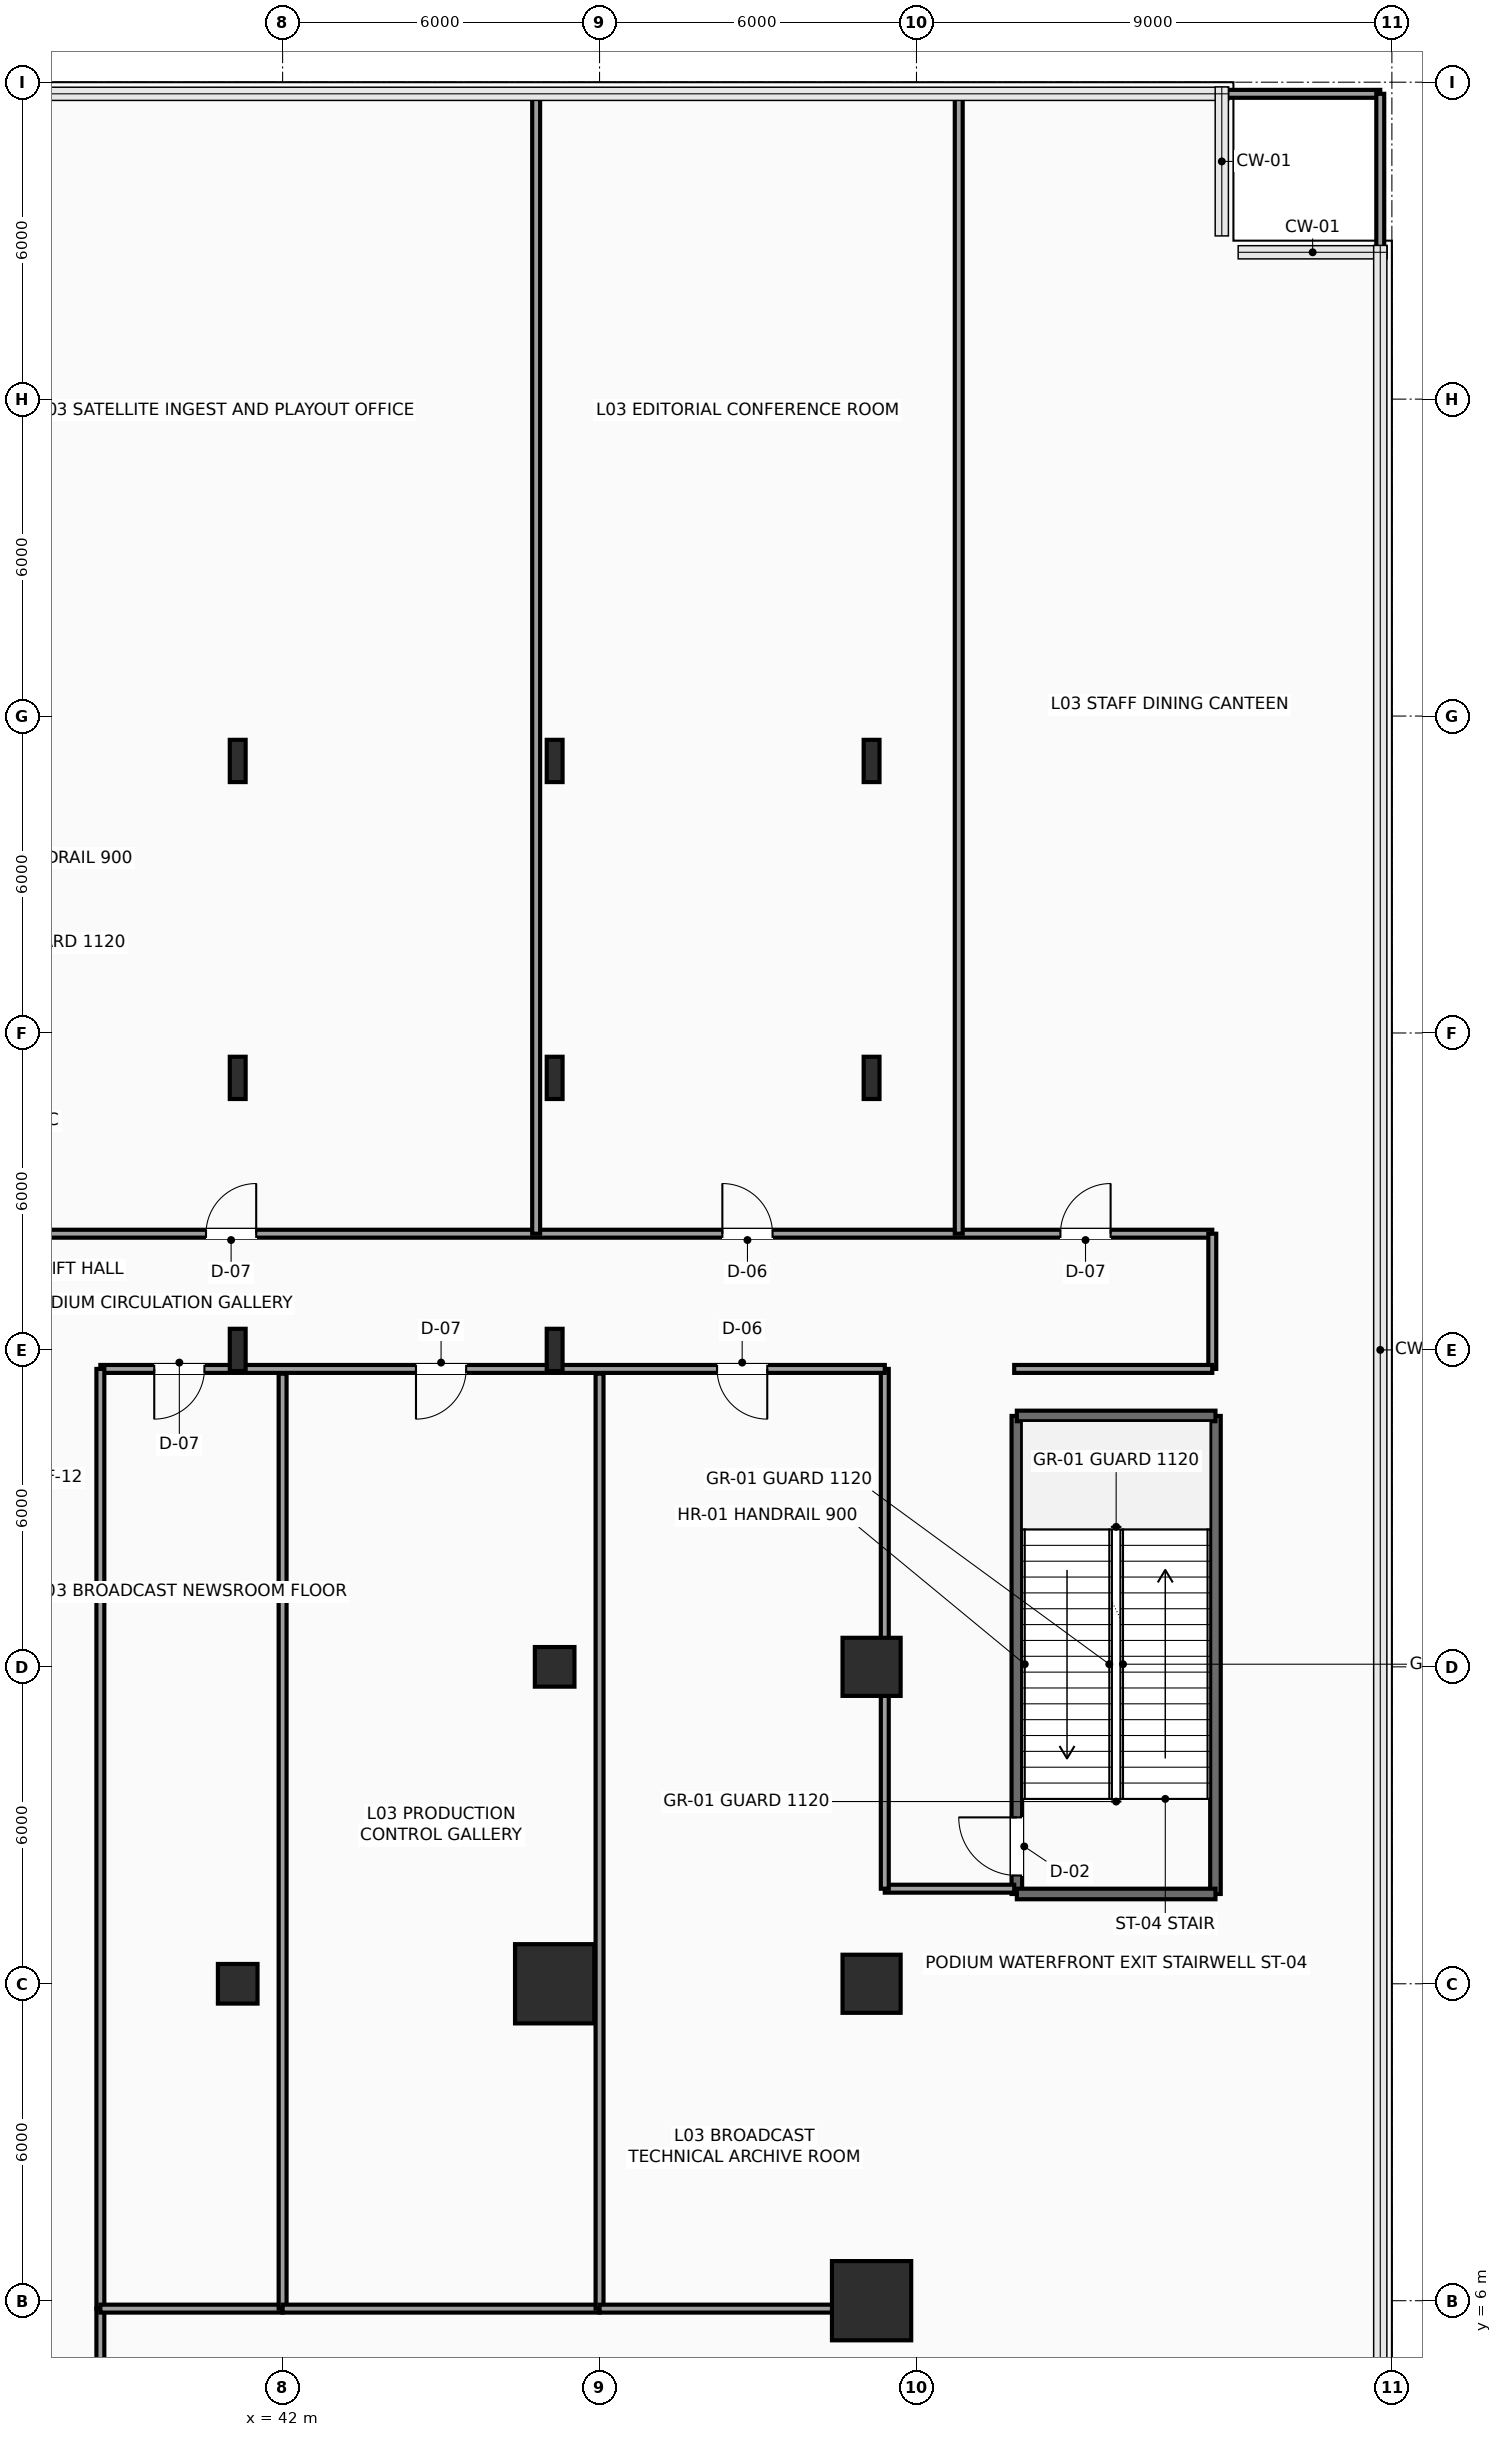
"""IFC4 building model, lengths in metres.
Left out: names, types, materials, properties, quantities, classifications, styles, units other than length and angle.
Written with IfcOpenShell. Run it as: python <this file> out.ifc"""

import sys

from ifc_helpers import new_model, si_unit, direction, frame, frame_2d, origin, origin_2d, place, context, subcontext, project, spatial, rectangle, hollow_rectangle, i_section, extrude, element, fill, save


model = new_model("IFC4")
c1 = context("Model", 3, precision=1e-05, world=origin(), true_north=direction((0.0, 1.0)))
c2 = subcontext(c1, "Body", "Model", "MODEL_VIEW")
j1 = project(units=[si_unit("LENGTHUNIT", "METRE"), si_unit("PLANEANGLEUNIT", "RADIAN")], contexts=[c1])
p1 = place(None, origin())
s1 = spatial("IfcSite", under=j1, at=p1, CompositionType="ELEMENT")
p2 = place(p1, origin())
s2 = spatial("IfcBuilding", under=s1, at=p2, CompositionType="ELEMENT")
p3 = place(p2, frame((0.0, 0.0, 16.5)))
s3 = spatial("IfcBuildingStorey", under=s2, at=p3, CompositionType="ELEMENT", Elevation=16.5)
p4 = place(p3, frame((41.15, 12.0, 0.0), z_axis=(0.0, 0.0, 1.0), x_axis=(1.0, 0.0, 0.0)))
e1 = element("IfcColumn", 1, at=p4, inside=s3, PredefinedType="COLUMN", context=c2, shape_type="SweptSolid", body=[
    extrude(hollow_rectangle(XDim=0.75, YDim=0.75, WallThickness=0.035, InnerFilletRadius=0.035, OuterFilletRadius=0.05, at=origin_2d()), origin(), (0.0, 0.0, 1.0), 5.4),
])
for number, where, z_axis, x_axis in (
    (2, (41.15, 24.0, 0.0), (0.0, 0.0, 1.0), (1.0, 0.0, 0.0)),
    (3, (41.15, 29.15, 0.0), (0.0, 0.0, 1.0), (1.0, 0.0, 0.0)),
    (4, (41.15, 35.15, 0.0), (0.0, 0.0, 1.0), (1.0, 0.0, 0.0)),
):
    element("IfcColumn", number, at=place(p3, frame(where, z_axis=z_axis, x_axis=x_axis)), inside=s3, PredefinedType="COLUMN", context=c2, shape_type="SweptSolid", body=[
        extrude(i_section(OverallWidth=0.3, OverallDepth=0.8, WebThickness=0.018, FlangeThickness=0.033, FilletRadius=0.03, at=origin_2d()), origin(), (0.0, 0.0, 1.0), 5.4),
    ])
p5 = place(p3, frame((47.15, 12.0, 0.0), z_axis=(0.0, 0.0, 1.0), x_axis=(1.0, 0.0, 0.0)))
e5 = element("IfcColumn", 5, at=p5, inside=s3, PredefinedType="COLUMN", context=c2, shape_type="SweptSolid", body=[
    extrude(rectangle(XDim=1.5, YDim=1.5, at=origin_2d()), origin(), (0.0, 0.0, 1.0), 5.4),
])
p6 = place(p3, frame((47.15, 18.0, 0.0), z_axis=(0.0, 0.0, 1.0), x_axis=(1.0, 0.0, 0.0)))
e6 = element("IfcColumn", 6, at=p6, inside=s3, PredefinedType="COLUMN", context=c2, shape_type="SweptSolid", body=[
    extrude(hollow_rectangle(XDim=0.75, YDim=0.75, WallThickness=0.035, InnerFilletRadius=0.035, OuterFilletRadius=0.05, at=origin_2d()), origin(), (0.0, 0.0, 1.0), 5.4),
])
for number, where, z_axis, x_axis in (
    (7, (47.15, 24.0, 0.0), (0.0, 0.0, 1.0), (1.0, 0.0, 0.0)),
    (8, (47.15, 29.15, 0.0), (0.0, 0.0, 1.0), (1.0, 0.0, 0.0)),
    (9, (47.15, 35.15, 0.0), (0.0, 0.0, 1.0), (1.0, 0.0, 0.0)),
):
    element("IfcColumn", number, at=place(p3, frame(where, z_axis=z_axis, x_axis=x_axis)), inside=s3, PredefinedType="COLUMN", context=c2, shape_type="SweptSolid", body=[
        extrude(i_section(OverallWidth=0.3, OverallDepth=0.8, WebThickness=0.018, FlangeThickness=0.033, FilletRadius=0.03, at=origin_2d()), origin(), (0.0, 0.0, 1.0), 5.4),
    ])
p7 = place(p3, frame((53.15, 6.0, 0.0), z_axis=(0.0, 0.0, 1.0), x_axis=(1.0, 0.0, 0.0)))
e10 = element("IfcColumn", 10, at=p7, inside=s3, PredefinedType="COLUMN", context=c2, shape_type="SweptSolid", body=[
    extrude(rectangle(XDim=1.5, YDim=1.5, at=origin_2d()), origin(), (0.0, 0.0, 1.0), 5.4),
])
for number, where, z_axis, x_axis in (
    (11, (53.15, 29.15, 0.0), (0.0, 0.0, 1.0), (1.0, 0.0, 0.0)),
    (12, (53.15, 35.15, 0.0), (0.0, 0.0, 1.0), (1.0, 0.0, 0.0)),
):
    element("IfcColumn", number, at=place(p3, frame(where, z_axis=z_axis, x_axis=x_axis)), inside=s3, PredefinedType="COLUMN", context=c2, shape_type="SweptSolid", body=[
        extrude(i_section(OverallWidth=0.3, OverallDepth=0.8, WebThickness=0.018, FlangeThickness=0.033, FilletRadius=0.03, at=origin_2d()), origin(), (0.0, 0.0, 1.0), 5.4),
    ])
for number, where, z_axis, x_axis in (
    (13, (53.15, 12.0, 0.0), (0.0, 0.0, 1.0), (1.0, 0.0, 0.0)),
    (14, (53.15, 18.0, 0.0), (0.0, 0.0, 1.0), (1.0, 0.0, 0.0)),
):
    element("IfcColumn", number, at=place(p3, frame(where, z_axis=z_axis, x_axis=x_axis)), inside=s3, PredefinedType="COLUMN", context=c2, shape_type="SweptSolid", body=[
        extrude(rectangle(XDim=1.1, YDim=1.1, at=origin_2d()), origin(), (0.0, 0.0, 1.0), 5.4),
    ])
p8 = place(p3, frame((55.9, 13.7, 0.0), z_axis=(0.0, 0.0, 1.0), x_axis=(0.0, 1.0, 0.0)))
e15 = element("IfcWall", 15, at=p8, inside=s3, PredefinedType="SHEAR", context=c2, shape_type="SweptSolid", body=[
    extrude(rectangle(XDim=9.05, YDim=0.2, at=frame_2d((4.525, 0.0))), origin(), (0.0, 0.0, 1.0), 5.125),
])
p9 = place(p8, frame((0.35, 0.0, 0.0)))
e16 = element("IfcOpeningElement", 16, at=p9, cuts=e15, PredefinedType="OPENING", context=c2, shape_type="SweptSolid", body=[
    extrude(rectangle(XDim=1.1, YDim=2.2, at=frame_2d((0.55, 1.1))), frame((0.0, 0.11, 0.0), z_axis=(0.0, -1.0, 0.0), x_axis=(1.0, 0.0, 0.0)), (0.0, 0.0, 1.0), 0.22),
])
p10 = place(p3, frame((59.66, 13.7, 0.0), z_axis=(0.0, 0.0, 1.0), x_axis=(0.0, 1.0, 0.0)))
e17 = element("IfcWall", 17, at=p10, inside=s3, PredefinedType="SHEAR", context=c2, shape_type="SweptSolid", body=[
    extrude(rectangle(XDim=9.05, YDim=0.2, at=frame_2d((4.525, 0.0))), origin(), (0.0, 0.0, 1.0), 5.125),
])
for number, where, z_axis, x_axis in (
    (18, (55.9, 13.7, 0.0), (0.0, 0.0, 1.0), (1.0, 0.0, 0.0)),
    (19, (55.9, 22.75, 0.0), (0.0, 0.0, 1.0), (1.0, 0.0, 0.0)),
):
    element("IfcWall", number, at=place(p3, frame(where, z_axis=z_axis, x_axis=x_axis)), inside=s3, PredefinedType="SHEAR", context=c2, shape_type="SweptSolid", body=[
        extrude(rectangle(XDim=3.76, YDim=0.2, at=frame_2d((1.88, 0.0))), origin(), (0.0, 0.0, 1.0), 5.125),
    ])
p11 = place(p3, frame((26.05, 26.2, 0.0), z_axis=(0.0, 0.0, 1.0), x_axis=(1.0, 0.0, 0.0)))
e20 = element("IfcWall", 20, at=p11, inside=s3, PredefinedType="PARTITIONING", context=c2, shape_type="SweptSolid", body=[
    extrude(rectangle(XDim=33.55, YDim=0.15, at=frame_2d((16.775, 0.0))), origin(), (0.0, 0.0, 1.0), 5.125),
])
p12 = place(p11, frame((2.45, 0.0, 0.0)))
e21 = element("IfcOpeningElement", 21, at=p12, cuts=e20, PredefinedType="OPENING", context=c2, shape_type="SweptSolid", body=[
    extrude(rectangle(XDim=0.9, YDim=2.1, at=frame_2d((0.45, 1.05))), frame((0.0, 0.085, 0.0), z_axis=(0.0, -1.0, 0.0), x_axis=(1.0, 0.0, 0.0)), (0.0, 0.0, 1.0), 0.17),
])
p13 = place(p11, frame((14.5, 0.0, 0.0)))
e22 = element("IfcOpeningElement", 22, at=p13, cuts=e20, PredefinedType="OPENING", context=c2, shape_type="SweptSolid", body=[
    extrude(rectangle(XDim=0.95, YDim=2.15, at=frame_2d((0.475, 1.075))), frame((0.0, 0.085, 0.0), z_axis=(0.0, -1.0, 0.0), x_axis=(1.0, 0.0, 0.0)), (0.0, 0.0, 1.0), 0.17),
])
p14 = place(p11, frame((24.275, 0.0, 0.0)))
e23 = element("IfcOpeningElement", 23, at=p14, cuts=e20, PredefinedType="OPENING", context=c2, shape_type="SweptSolid", body=[
    extrude(rectangle(XDim=0.95, YDim=2.15, at=frame_2d((0.475, 1.075))), frame((0.0, 0.085, 0.0), z_axis=(0.0, -1.0, 0.0), x_axis=(1.0, 0.0, 0.0)), (0.0, 0.0, 1.0), 0.17),
])
p15 = place(p11, frame((30.675, 0.0, 0.0)))
e24 = element("IfcOpeningElement", 24, at=p15, cuts=e20, PredefinedType="OPENING", context=c2, shape_type="SweptSolid", body=[
    extrude(rectangle(XDim=0.95, YDim=2.15, at=frame_2d((0.475, 1.075))), frame((0.0, 0.085, 0.0), z_axis=(0.0, -1.0, 0.0), x_axis=(1.0, 0.0, 0.0)), (0.0, 0.0, 1.0), 0.17),
])
p16 = place(p3, frame((59.6, 26.2, 0.0), z_axis=(0.0, 0.0, 1.0), x_axis=(0.0, -1.0, 0.0)))
e25 = element("IfcWall", 25, at=p16, inside=s3, PredefinedType="PARTITIONING", context=c2, shape_type="SweptSolid", body=[
    extrude(rectangle(XDim=2.56, YDim=0.15, at=frame_2d((1.28, 0.0))), origin(), (0.0, 0.0, 1.0), 5.125),
])
p17 = place(p3, frame((59.6, 23.64, 0.0), z_axis=(0.0, 0.0, 1.0), x_axis=(-1.0, 0.0, 0.0)))
e26 = element("IfcWall", 26, at=p17, inside=s3, PredefinedType="PARTITIONING", context=c2, shape_type="SweptSolid", body=[
    extrude(rectangle(XDim=3.75, YDim=0.15, at=frame_2d((1.875, 0.0))), origin(), (0.0, 0.0, 1.0), 5.125),
])
p18 = place(p3, frame((55.85, 13.8, 0.0), z_axis=(0.0, 0.0, 1.0), x_axis=(-1.0, 0.0, 0.0)))
e27 = element("IfcWall", 27, at=p18, inside=s3, PredefinedType="PARTITIONING", context=c2, shape_type="SweptSolid", body=[
    extrude(rectangle(XDim=2.45, YDim=0.15, at=frame_2d((1.225, 0.0))), origin(), (0.0, 0.0, 1.0), 5.125),
])
p19 = place(p3, frame((53.4, 13.8, 0.0), z_axis=(0.0, 0.0, 1.0), x_axis=(0.0, 1.0, 0.0)))
e28 = element("IfcWall", 28, at=p19, inside=s3, PredefinedType="PARTITIONING", context=c2, shape_type="SweptSolid", body=[
    extrude(rectangle(XDim=9.84, YDim=0.15, at=frame_2d((4.92, 0.0))), origin(), (0.0, 0.0, 1.0), 5.125),
])
p20 = place(p3, frame((53.4, 23.64, 0.0), z_axis=(0.0, 0.0, 1.0), x_axis=(-1.0, 0.0, 0.0)))
e29 = element("IfcWall", 29, at=p20, inside=s3, PredefinedType="PARTITIONING", context=c2, shape_type="SweptSolid", body=[
    extrude(rectangle(XDim=14.85, YDim=0.15, at=frame_2d((7.425, 0.0))), origin(), (0.0, 0.0, 1.0), 5.125),
])
p21 = place(p20, frame((12.88, 0.0, 0.0)))
e30 = element("IfcOpeningElement", 30, at=p21, cuts=e29, PredefinedType="OPENING", context=c2, shape_type="SweptSolid", body=[
    extrude(rectangle(XDim=0.95, YDim=2.15, at=frame_2d((0.475, 1.075))), frame((0.0, 0.085, 0.0), z_axis=(0.0, -1.0, 0.0), x_axis=(1.0, 0.0, 0.0)), (0.0, 0.0, 1.0), 0.17),
])
p22 = place(p20, frame((7.925, 0.0, 0.0)))
e31 = element("IfcOpeningElement", 31, at=p22, cuts=e29, PredefinedType="OPENING", context=c2, shape_type="SweptSolid", body=[
    extrude(rectangle(XDim=0.95, YDim=2.15, at=frame_2d((0.475, 1.075))), frame((0.0, 0.085, 0.0), z_axis=(0.0, -1.0, 0.0), x_axis=(1.0, 0.0, 0.0)), (0.0, 0.0, 1.0), 0.17),
])
p23 = place(p20, frame((2.225, 0.0, 0.0)))
e32 = element("IfcOpeningElement", 32, at=p23, cuts=e29, PredefinedType="OPENING", context=c2, shape_type="SweptSolid", body=[
    extrude(rectangle(XDim=0.95, YDim=2.15, at=frame_2d((0.475, 1.075))), frame((0.0, 0.085, 0.0), z_axis=(0.0, -1.0, 0.0), x_axis=(1.0, 0.0, 0.0)), (0.0, 0.0, 1.0), 0.17),
])
p24 = place(p3, frame((38.55, 23.64, 0.0), z_axis=(0.0, 0.0, 1.0), x_axis=(0.0, -1.0, 0.0)))
e33 = element("IfcWall", 33, at=p24, inside=s3, PredefinedType="PARTITIONING", context=c2, shape_type="SweptSolid", body=[
    extrude(rectangle(XDim=17.79, YDim=0.15, at=frame_2d((8.895, 0.0))), origin(), (0.0, 0.0, 1.0), 5.125),
])
p25 = place(p3, frame((38.55, 5.85, 0.0), z_axis=(0.0, 0.0, 1.0), x_axis=(0.0, -1.0, 0.0)))
e34 = element("IfcWall", 34, at=p25, inside=s3, PredefinedType="PARTITIONING", context=c2, shape_type="SweptSolid", body=[
    extrude(rectangle(XDim=2.4, YDim=0.15, at=frame_2d((1.2, 0.0))), origin(), (0.0, 0.0, 1.0), 5.125),
])
p26 = place(p3, frame((38.55, 5.85, 0.0), z_axis=(0.0, 0.0, 1.0), x_axis=(1.0, 0.0, 0.0)))
e35 = element("IfcWall", 35, at=p26, inside=s3, PredefinedType="PARTITIONING", context=c2, shape_type="SweptSolid", body=[
    extrude(rectangle(XDim=3.45, YDim=0.15, at=frame_2d((1.725, 0.0))), origin(), (0.0, 0.0, 1.0), 5.125),
])
p27 = place(p3, frame((42.0, 5.85, 0.0), z_axis=(0.0, 0.0, 1.0), x_axis=(0.0, 1.0, 0.0)))
e36 = element("IfcWall", 36, at=p27, inside=s3, PredefinedType="PARTITIONING", context=c2, shape_type="SweptSolid", body=[
    extrude(rectangle(XDim=17.7, YDim=0.15, at=frame_2d((8.85, 0.0))), origin(), (0.0, 0.0, 1.0), 5.125),
])
p28 = place(p3, frame((42.0, 5.85, 0.0), z_axis=(0.0, 0.0, 1.0), x_axis=(1.0, 0.0, 0.0)))
e37 = element("IfcWall", 37, at=p28, inside=s3, PredefinedType="PARTITIONING", context=c2, shape_type="SweptSolid", body=[
    extrude(rectangle(XDim=6.0, YDim=0.15, at=frame_2d((3.0, 0.0))), origin(), (0.0, 0.0, 1.0), 5.125),
])
p29 = place(p3, frame((48.0, 5.85, 0.0), z_axis=(0.0, 0.0, 1.0), x_axis=(0.0, 1.0, 0.0)))
e38 = element("IfcWall", 38, at=p29, inside=s3, PredefinedType="PARTITIONING", context=c2, shape_type="SweptSolid", body=[
    extrude(rectangle(XDim=17.7, YDim=0.15, at=frame_2d((8.85, 0.0))), origin(), (0.0, 0.0, 1.0), 5.125),
])
p30 = place(p3, frame((48.0, 5.85, 0.0), z_axis=(0.0, 0.0, 1.0), x_axis=(1.0, 0.0, 0.0)))
e39 = element("IfcWall", 39, at=p30, inside=s3, PredefinedType="PARTITIONING", context=c2, shape_type="SweptSolid", body=[
    extrude(rectangle(XDim=5.4, YDim=0.15, at=frame_2d((2.7, 0.0))), origin(), (0.0, 0.0, 1.0), 5.125),
])
for number, where, z_axis, x_axis in (
    (40, (46.8, 26.2, 0.0), (0.0, 0.0, 1.0), (0.0, 1.0, 0.0)),
    (41, (54.8, 26.2, 0.0), (0.0, 0.0, 1.0), (0.0, 1.0, 0.0)),
):
    element("IfcWall", number, at=place(p3, frame(where, z_axis=z_axis, x_axis=x_axis)), inside=s3, PredefinedType="PARTITIONING", context=c2, shape_type="SweptSolid", body=[
        extrude(rectangle(XDim=21.58, YDim=0.15, at=frame_2d((10.79, 0.0))), origin(), (0.0, 0.0, 1.0), 5.125),
    ])
p31 = place(p3, frame((54.8, 47.78, 0.0), z_axis=(0.0, 0.0, 1.0), x_axis=(1.0, 0.0, 0.0)))
e42 = element("IfcWall", 42, at=p31, inside=s3, PredefinedType="PARTITIONING", context=c2, shape_type="SweptSolid", body=[
    extrude(rectangle(XDim=7.98, YDim=0.15, at=frame_2d((3.99, 0.0))), origin(), (0.0, 0.0, 1.0), 5.125),
])
p32 = place(p3, frame((62.78, 26.2, 0.0), z_axis=(0.0, 0.0, 1.0), x_axis=(0.0, 1.0, 0.0)))
e43 = element("IfcWall", 43, at=p32, inside=s3, PredefinedType="PARTITIONING", context=c2, shape_type="SweptSolid", body=[
    extrude(rectangle(XDim=21.58, YDim=0.15, at=frame_2d((10.79, 0.0))), origin(), (0.0, 0.0, 1.0), 5.125),
])
p33 = place(p9, origin())
e44 = element("IfcDoor", 44, at=p33, inside=s3, OperationType="SINGLE_SWING_RIGHT", PredefinedType="DOOR", context=c2, shape_type="SweptSolid", body=[
    extrude(rectangle(XDim=1.1, YDim=2.2, at=frame_2d((0.55, 1.1))), frame((0.0, 0.025, 0.0), z_axis=(0.0, -1.0, 0.0), x_axis=(1.0, 0.0, 0.0)), (0.0, 0.0, 1.0), 0.05),
])
fill(e16, e44)
p34 = place(p13, origin())
e45 = element("IfcDoor", 45, at=p34, inside=s3, OperationType="SINGLE_SWING_RIGHT", PredefinedType="DOOR", context=c2, shape_type="SweptSolid", body=[
    extrude(rectangle(XDim=0.95, YDim=2.15, at=frame_2d((0.475, 1.075))), frame((0.0, 0.025, 0.0), z_axis=(0.0, -1.0, 0.0), x_axis=(1.0, 0.0, 0.0)), (0.0, 0.0, 1.0), 0.05),
])
fill(e22, e45)
p35 = place(p14, origin())
e46 = element("IfcDoor", 46, at=p35, inside=s3, OperationType="SINGLE_SWING_LEFT", PredefinedType="DOOR", context=c2, shape_type="SweptSolid", body=[
    extrude(rectangle(XDim=0.95, YDim=2.15, at=frame_2d((0.475, 1.075))), frame((0.0, 0.025, 0.0), z_axis=(0.0, -1.0, 0.0), x_axis=(1.0, 0.0, 0.0)), (0.0, 0.0, 1.0), 0.05),
])
fill(e23, e46)
p36 = place(p15, origin())
e47 = element("IfcDoor", 47, at=p36, inside=s3, OperationType="SINGLE_SWING_RIGHT", PredefinedType="DOOR", context=c2, shape_type="SweptSolid", body=[
    extrude(rectangle(XDim=0.95, YDim=2.15, at=frame_2d((0.475, 1.075))), frame((0.0, 0.025, 0.0), z_axis=(0.0, -1.0, 0.0), x_axis=(1.0, 0.0, 0.0)), (0.0, 0.0, 1.0), 0.05),
])
fill(e24, e47)
p37 = place(p21, origin())
e48 = element("IfcDoor", 48, at=p37, inside=s3, OperationType="SINGLE_SWING_RIGHT", PredefinedType="DOOR", context=c2, shape_type="SweptSolid", body=[
    extrude(rectangle(XDim=0.95, YDim=2.15, at=frame_2d((0.475, 1.075))), frame((0.0, 0.025, 0.0), z_axis=(0.0, -1.0, 0.0), x_axis=(1.0, 0.0, 0.0)), (0.0, 0.0, 1.0), 0.05),
])
fill(e30, e48)
p38 = place(p22, origin())
e49 = element("IfcDoor", 49, at=p38, inside=s3, OperationType="SINGLE_SWING_RIGHT", PredefinedType="DOOR", context=c2, shape_type="SweptSolid", body=[
    extrude(rectangle(XDim=0.95, YDim=2.15, at=frame_2d((0.475, 1.075))), frame((0.0, 0.025, 0.0), z_axis=(0.0, -1.0, 0.0), x_axis=(1.0, 0.0, 0.0)), (0.0, 0.0, 1.0), 0.05),
])
fill(e31, e49)
p39 = place(p23, origin())
e50 = element("IfcDoor", 50, at=p39, inside=s3, OperationType="SINGLE_SWING_LEFT", PredefinedType="DOOR", context=c2, shape_type="SweptSolid", body=[
    extrude(rectangle(XDim=0.95, YDim=2.15, at=frame_2d((0.475, 1.075))), frame((0.0, 0.025, 0.0), z_axis=(0.0, -1.0, 0.0), x_axis=(1.0, 0.0, 0.0)), (0.0, 0.0, 1.0), 0.05),
])
fill(e32, e50)
save(model, sys.argv[1])
